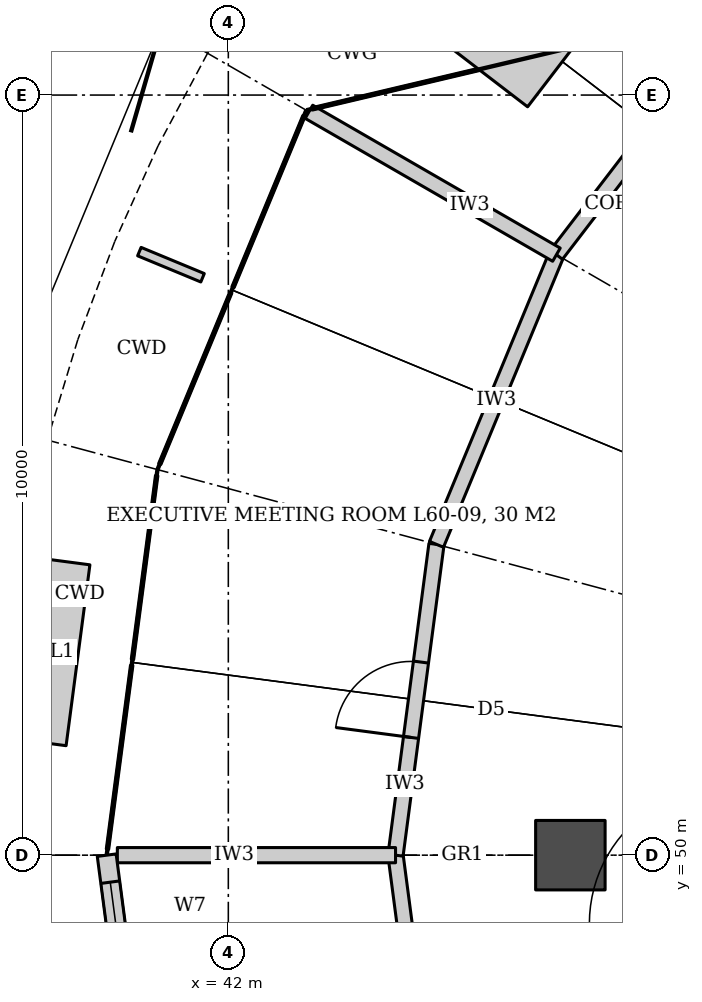
"""IFC4 building model, lengths in metres.
Left out: names, types, materials, properties, quantities, classifications, styles, units other than length and angle.
Written with IfcOpenShell. Run it as: python <this file> out.ifc"""

import sys

from ifc_helpers import new_model, si_unit, direction, frame, frame_2d, origin, origin_2d, place, context, subcontext, project, spatial, rectangle, hollow_circle, extrude, element, fill, save


model = new_model("IFC4")
c1 = context("Model", 3, precision=1e-05, world=origin(), true_north=direction((0.0, 1.0)))
c2 = subcontext(c1, "Body", "Model", "MODEL_VIEW")
j1 = project(units=[si_unit("LENGTHUNIT", "METRE"), si_unit("PLANEANGLEUNIT", "RADIAN")], contexts=[c1])
p1 = place(None, origin())
s1 = spatial("IfcSite", under=j1, at=p1, CompositionType="ELEMENT")
p2 = place(p1, origin())
s2 = spatial("IfcBuilding", under=s1, at=p2, CompositionType="ELEMENT")
p3 = place(p2, frame((0.0, 0.0, 261.2)))
s3 = spatial("IfcBuildingStorey", under=s2, at=p3, CompositionType="ELEMENT", Elevation=261.2)
p4 = place(p3, frame((46.5, 50.0, 0.0), z_axis=(0.0, 0.0, 1.0), x_axis=(1.0, 0.0, 0.0)))
e1 = element("IfcColumn", 1, at=p4, inside=s3, PredefinedType="COLUMN", context=c2, shape_type="SweptSolid", body=[
    extrude(hollow_circle(Radius=0.457, WallThickness=0.045, at=origin_2d()), origin(), (0.0, 0.0, 1.0), 4.2),
])
p5 = place(p3, frame((44.738, 45.911, 0.0), z_axis=(0.0, 0.0, 1.0), x_axis=(-0.130515758099, 0.991446234996, 0.0)))
e2 = element("IfcWall", 2, at=p5, inside=s3, PredefinedType="PARTITIONING", context=c2, shape_type="SweptSolid", body=[
    extrude(rectangle(XDim=4.125, YDim=0.2, at=frame_2d((2.062, 0.0))), origin(), (0.0, 0.0, 1.0), 3.02),
])
p6 = place(p3, frame((44.2, 50.0, 0.0), z_axis=(0.0, 0.0, 1.0), x_axis=(0.130515758099, 0.991446234996, 0.0)))
e3 = element("IfcWall", 3, at=p6, inside=s3, PredefinedType="PARTITIONING", context=c2, shape_type="SweptSolid", body=[
    extrude(rectangle(XDim=4.125, YDim=0.2, at=frame_2d((2.062, 0.0))), origin(), (0.0, 0.0, 1.0), 3.02),
])
p7 = place(p6, frame((1.562, 0.0, 0.0)))
e4 = element("IfcOpeningElement", 4, at=p7, cuts=e3, PredefinedType="OPENING", context=c2, shape_type="SweptSolid", body=[
    extrude(rectangle(XDim=1.0, YDim=2.1, at=frame_2d((0.5, 1.05))), frame((0.0, 0.11, 0.0), z_axis=(0.0, -1.0, 0.0), x_axis=(1.0, 0.0, 0.0)), (0.0, 0.0, 1.0), 0.22),
])
p8 = place(p3, frame((44.738, 54.089, 0.0), z_axis=(0.0, 0.0, 1.0), x_axis=(0.382731667114, 0.923859551549, 0.0)))
e5 = element("IfcWall", 5, at=p8, inside=s3, PredefinedType="PARTITIONING", context=c2, shape_type="SweptSolid", body=[
    extrude(rectangle(XDim=4.125, YDim=0.2, at=frame_2d((2.062, 0.0))), origin(), (0.0, 0.0, 1.0), 3.02),
])
p9 = place(p3, frame((46.317, 57.9, 0.0), z_axis=(0.0, 0.0, 1.0), x_axis=(0.608752668552, 0.793360062349, 0.0)))
e6 = element("IfcWall", 6, at=p9, inside=s3, PredefinedType="PARTITIONING", context=c2, shape_type="SweptSolid", body=[
    extrude(rectangle(XDim=4.053, YDim=0.2, at=frame_2d((2.027, 0.0))), origin(), (0.0, 0.0, 1.0), 3.02),
])
p10 = place(p3, frame((46.317, 57.9, 0.0), z_axis=(0.0, 0.0, 1.0), x_axis=(-0.866016909885, 0.500014711578, 0.0)))
e7 = element("IfcWall", 7, at=p10, inside=s3, PredefinedType="PARTITIONING", context=c2, shape_type="SweptSolid", body=[
    extrude(rectangle(XDim=3.76, YDim=0.2, at=frame_2d((1.88, 0.0))), origin(), (0.0, 0.0, 1.0), 3.02),
])
p11 = place(p3, frame((44.2, 50.0, 0.0), z_axis=(0.0, 0.0, 1.0), x_axis=(-1.0, 0.0, 0.0)))
e8 = element("IfcWall", 8, at=p11, inside=s3, PredefinedType="PARTITIONING", context=c2, shape_type="SweptSolid", body=[
    extrude(rectangle(XDim=3.66, YDim=0.2, at=frame_2d((1.83, 0.0))), origin(), (0.0, 0.0, 1.0), 3.02),
])
p12 = place(p3, frame((40.4, 50.0, 0.0), z_axis=(0.0, 0.0, 1.0), x_axis=(0.130550788349, -0.991441622922, 0.0)))
e9 = element("IfcWall", 9, at=p12, inside=s3, PredefinedType="SOLIDWALL", context=c2, shape_type="SweptSolid", body=[
    extrude(rectangle(XDim=5.116, YDim=0.25, at=frame_2d((2.558, 0.0))), origin(), (0.0, 0.0, 1.0), 4.04),
])
p13 = place(p12, frame((1.658, 0.0, 0.0)))
e10 = element("IfcOpeningElement", 10, at=p13, cuts=e9, PredefinedType="OPENING", context=c2, shape_type="SweptSolid", body=[
    extrude(rectangle(XDim=1.8, YDim=2.4, at=frame_2d((0.9, 1.2))), frame((0.0, 0.135, 0.0), z_axis=(0.0, -1.0, 0.0), x_axis=(1.0, 0.0, 0.0)), (0.0, 0.0, 1.0), 0.27),
])
p14 = place(p12, frame((0.358, 0.0, 0.0)))
e11 = element("IfcOpeningElement", 11, at=p14, cuts=e9, PredefinedType="OPENING", context=c2, shape_type="SweptSolid", body=[
    extrude(rectangle(XDim=0.9, YDim=2.4, at=frame_2d((0.45, 1.2))), frame((0.0, 0.135, 0.0), z_axis=(0.0, -1.0, 0.0), x_axis=(1.0, 0.0, 0.0)), (0.0, 0.0, 1.0), 0.27),
])
p15 = place(p12, frame((3.858, 0.0, 0.0)))
e12 = element("IfcOpeningElement", 12, at=p15, cuts=e9, PredefinedType="OPENING", context=c2, shape_type="SweptSolid", body=[
    extrude(rectangle(XDim=0.9, YDim=2.4, at=frame_2d((0.45, 1.2))), frame((0.0, 0.135, 0.0), z_axis=(0.0, -1.0, 0.0), x_axis=(1.0, 0.0, 0.0)), (0.0, 0.0, 1.0), 0.27),
])
p16 = place(p7, origin())
e13 = element("IfcDoor", 13, at=p16, inside=s3, OperationType="SINGLE_SWING_LEFT", PredefinedType="DOOR", context=c2, shape_type="SweptSolid", body=[
    extrude(rectangle(XDim=1.0, YDim=2.1, at=frame_2d((0.5, 1.05))), frame((0.0, 0.025, 0.0), z_axis=(0.0, -1.0, 0.0), x_axis=(1.0, 0.0, 0.0)), (0.0, 0.0, 1.0), 0.05),
])
fill(e4, e13)
p17 = place(p14, origin())
e14 = element("IfcWindow", 14, at=p17, inside=s3, PartitioningType="SINGLE_PANEL", PredefinedType="WINDOW", context=c2, shape_type="SweptSolid", body=[
    extrude(rectangle(XDim=0.9, YDim=2.4, at=frame_2d((0.45, 1.2))), frame((0.0, 0.03, 0.0), z_axis=(0.0, -1.0, 0.0), x_axis=(1.0, 0.0, 0.0)), (0.0, 0.0, 1.0), 0.06),
])
fill(e11, e14)
save(model, sys.argv[1])
